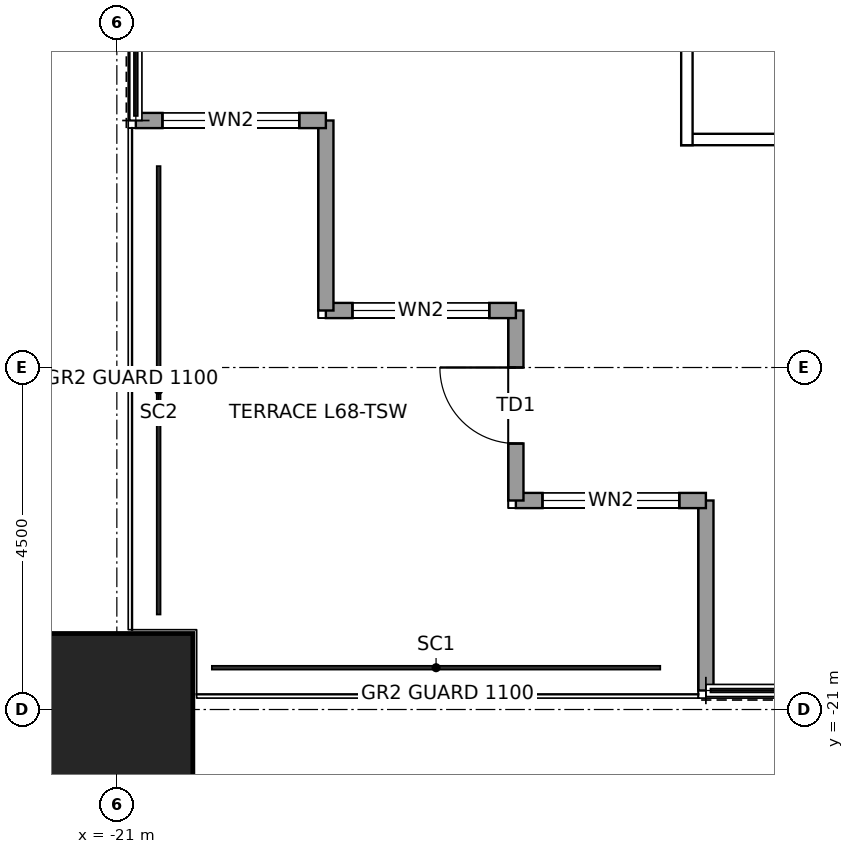
"""IFC4 building model, lengths in metres.
Left out: names, types, materials, properties, quantities, classifications, styles, units other than length and angle.
Written with IfcOpenShell. Run it as: python <this file> out.ifc"""

import sys

from ifc_helpers import new_model, si_unit, direction, frame, frame_2d, origin, origin_2d, place, context, subcontext, project, spatial, rectangle, hollow_rectangle, extrude, element, fill, save


model = new_model("IFC4")
c1 = context("Model", 3, precision=1e-05, world=origin(), true_north=direction((0.0, 1.0)))
c2 = subcontext(c1, "Body", "Model", "MODEL_VIEW")
j1 = project(units=[si_unit("LENGTHUNIT", "METRE"), si_unit("PLANEANGLEUNIT", "RADIAN")], contexts=[c1])
p1 = place(None, origin())
s1 = spatial("IfcSite", under=j1, at=p1, CompositionType="ELEMENT")
p2 = place(p1, origin())
s2 = spatial("IfcBuilding", under=s1, at=p2, CompositionType="ELEMENT")
p3 = place(p2, frame((0.0, 0.0, 307.9)))
s3 = spatial("IfcBuildingStorey", under=s2, at=p3, CompositionType="ELEMENT", Elevation=307.9)
p4 = place(p3, frame((-21.0, -21.0, 0.0), z_axis=(0.0, 0.0, 1.0), x_axis=(1.0, 0.0, 0.0)))
e1 = element("IfcColumn", 1, at=p4, inside=s3, PredefinedType="COLUMN", context=c2, shape_type="SweptSolid", body=[
    extrude(hollow_rectangle(XDim=2.0, YDim=2.0, WallThickness=0.095, at=origin_2d()), origin(), (0.0, 0.0, 1.0), 4.0),
])
p5 = place(p3, frame((-13.25, -20.75, 0.0), z_axis=(0.0, 0.0, 1.0), x_axis=(0.0, 1.0, 0.0)))
e2 = element("IfcWall", 2, at=p5, inside=s3, PredefinedType="SOLIDWALL", context=c2, shape_type="SweptSolid", body=[
    extrude(rectangle(XDim=2.5, YDim=0.2, at=frame_2d((1.25, 0.0))), origin(), (0.0, 0.0, 1.0), 3.85),
])
p6 = place(p3, frame((-13.25, -18.25, 0.0), z_axis=(0.0, 0.0, 1.0), x_axis=(-1.0, 0.0, 0.0)))
e3 = element("IfcWall", 3, at=p6, inside=s3, PredefinedType="SOLIDWALL", context=c2, shape_type="SweptSolid", body=[
    extrude(rectangle(XDim=2.5, YDim=0.2, at=frame_2d((1.25, 0.0))), origin(), (0.0, 0.0, 1.0), 3.85),
])
p7 = place(p6, frame((0.35, 0.0, 0.3)))
e4 = element("IfcOpeningElement", 4, at=p7, cuts=e3, PredefinedType="OPENING", context=c2, shape_type="SweptSolid", body=[
    extrude(rectangle(XDim=1.8, YDim=2.4, at=frame_2d((0.9, 1.2))), frame((0.0, 0.11, 0.0), z_axis=(0.0, -1.0, 0.0), x_axis=(1.0, 0.0, 0.0)), (0.0, 0.0, 1.0), 0.22),
])
p8 = place(p3, frame((-15.75, -18.25, 0.0), z_axis=(0.0, 0.0, 1.0), x_axis=(0.0, 1.0, 0.0)))
e5 = element("IfcWall", 5, at=p8, inside=s3, PredefinedType="SOLIDWALL", context=c2, shape_type="SweptSolid", body=[
    extrude(rectangle(XDim=2.5, YDim=0.2, at=frame_2d((1.25, 0.0))), origin(), (0.0, 0.0, 1.0), 3.317),
])
p9 = place(p8, frame((0.75, 0.0, 0.0)))
e6 = element("IfcOpeningElement", 6, at=p9, cuts=e5, PredefinedType="OPENING", context=c2, shape_type="SweptSolid", body=[
    extrude(rectangle(XDim=1.0, YDim=2.4, at=frame_2d((0.5, 1.2))), frame((0.0, 0.11, 0.0), z_axis=(0.0, -1.0, 0.0), x_axis=(1.0, 0.0, 0.0)), (0.0, 0.0, 1.0), 0.22),
])
p10 = place(p3, frame((-15.75, -15.75, 0.0), z_axis=(0.0, 0.0, 1.0), x_axis=(-1.0, 0.0, 0.0)))
e7 = element("IfcWall", 7, at=p10, inside=s3, PredefinedType="SOLIDWALL", context=c2, shape_type="SweptSolid", body=[
    extrude(rectangle(XDim=2.5, YDim=0.2, at=frame_2d((1.25, 0.0))), origin(), (0.0, 0.0, 1.0), 3.85),
])
p11 = place(p10, frame((0.35, 0.0, 0.3)))
e8 = element("IfcOpeningElement", 8, at=p11, cuts=e7, PredefinedType="OPENING", context=c2, shape_type="SweptSolid", body=[
    extrude(rectangle(XDim=1.8, YDim=2.4, at=frame_2d((0.9, 1.2))), frame((0.0, 0.11, 0.0), z_axis=(0.0, -1.0, 0.0), x_axis=(1.0, 0.0, 0.0)), (0.0, 0.0, 1.0), 0.22),
])
p12 = place(p3, frame((-18.25, -15.75, 0.0), z_axis=(0.0, 0.0, 1.0), x_axis=(0.0, 1.0, 0.0)))
e9 = element("IfcWall", 9, at=p12, inside=s3, PredefinedType="SOLIDWALL", context=c2, shape_type="SweptSolid", body=[
    extrude(rectangle(XDim=2.5, YDim=0.2, at=frame_2d((1.25, 0.0))), origin(), (0.0, 0.0, 1.0), 3.85),
])
p13 = place(p3, frame((-18.25, -13.25, 0.0), z_axis=(0.0, 0.0, 1.0), x_axis=(-1.0, 0.0, 0.0)))
e10 = element("IfcWall", 10, at=p13, inside=s3, PredefinedType="SOLIDWALL", context=c2, shape_type="SweptSolid", body=[
    extrude(rectangle(XDim=2.5, YDim=0.2, at=frame_2d((1.25, 0.0))), origin(), (0.0, 0.0, 1.0), 3.85),
])
p14 = place(p13, frame((0.35, 0.0, 0.3)))
e11 = element("IfcOpeningElement", 11, at=p14, cuts=e10, PredefinedType="OPENING", context=c2, shape_type="SweptSolid", body=[
    extrude(rectangle(XDim=1.8, YDim=2.4, at=frame_2d((0.9, 1.2))), frame((0.0, 0.11, 0.0), z_axis=(0.0, -1.0, 0.0), x_axis=(1.0, 0.0, 0.0)), (0.0, 0.0, 1.0), 0.22),
])
p15 = place(p3, frame((-13.575, -13.5, 0.0), z_axis=(0.0, 0.0, 1.0), x_axis=(1.0, 0.0, 0.0)))
e12 = element("IfcWall", 12, at=p15, inside=s3, PredefinedType="PARTITIONING", context=c2, shape_type="SweptSolid", body=[
    extrude(rectangle(XDim=13.65, YDim=0.15, at=frame_2d((6.825, 0.0))), origin(), (0.0, 0.0, 1.0), 3.85),
])
p16 = place(p15, frame((3.825, 0.0, 0.0)))
e13 = element("IfcOpeningElement", 13, at=p16, cuts=e12, PredefinedType="OPENING", context=c2, shape_type="SweptSolid", body=[
    extrude(rectangle(XDim=1.0, YDim=2.4, at=frame_2d((0.5, 1.2))), frame((0.0, 0.085, 0.0), z_axis=(0.0, -1.0, 0.0), x_axis=(1.0, 0.0, 0.0)), (0.0, 0.0, 1.0), 0.17),
])
p17 = place(p3, frame((-13.5, -13.575, 0.0), z_axis=(0.0, 0.0, 1.0), x_axis=(0.0, 1.0, 0.0)))
e14 = element("IfcWall", 14, at=p17, inside=s3, PredefinedType="PARTITIONING", context=c2, shape_type="SweptSolid", body=[
    extrude(rectangle(XDim=13.65, YDim=0.15, at=frame_2d((6.825, 0.0))), origin(), (0.0, 0.0, 1.0), 3.85),
])
p18 = place(p7, origin())
e15 = element("IfcWindow", 15, at=p18, inside=s3, PartitioningType="SINGLE_PANEL", PredefinedType="WINDOW", context=c2, shape_type="SweptSolid", body=[
    extrude(rectangle(XDim=1.8, YDim=2.4, at=frame_2d((0.9, 1.2))), frame((0.0, 0.03, 0.0), z_axis=(0.0, -1.0, 0.0), x_axis=(1.0, 0.0, 0.0)), (0.0, 0.0, 1.0), 0.06),
])
fill(e4, e15)
p19 = place(p9, origin())
e16 = element("IfcDoor", 16, at=p19, inside=s3, OperationType="SINGLE_SWING_RIGHT", PredefinedType="DOOR", context=c2, shape_type="SweptSolid", body=[
    extrude(rectangle(XDim=1.0, YDim=2.4, at=frame_2d((0.5, 1.2))), frame((0.0, 0.025, 0.0), z_axis=(0.0, -1.0, 0.0), x_axis=(1.0, 0.0, 0.0)), (0.0, 0.0, 1.0), 0.05),
])
fill(e6, e16)
p20 = place(p11, origin())
e17 = element("IfcWindow", 17, at=p20, inside=s3, PartitioningType="SINGLE_PANEL", PredefinedType="WINDOW", context=c2, shape_type="SweptSolid", body=[
    extrude(rectangle(XDim=1.8, YDim=2.4, at=frame_2d((0.9, 1.2))), frame((0.0, 0.03, 0.0), z_axis=(0.0, -1.0, 0.0), x_axis=(1.0, 0.0, 0.0)), (0.0, 0.0, 1.0), 0.06),
])
fill(e8, e17)
p21 = place(p14, origin())
e18 = element("IfcWindow", 18, at=p21, inside=s3, PartitioningType="SINGLE_PANEL", PredefinedType="WINDOW", context=c2, shape_type="SweptSolid", body=[
    extrude(rectangle(XDim=1.8, YDim=2.4, at=frame_2d((0.9, 1.2))), frame((0.0, 0.03, 0.0), z_axis=(0.0, -1.0, 0.0), x_axis=(1.0, 0.0, 0.0)), (0.0, 0.0, 1.0), 0.06),
])
fill(e11, e18)
save(model, sys.argv[1])
